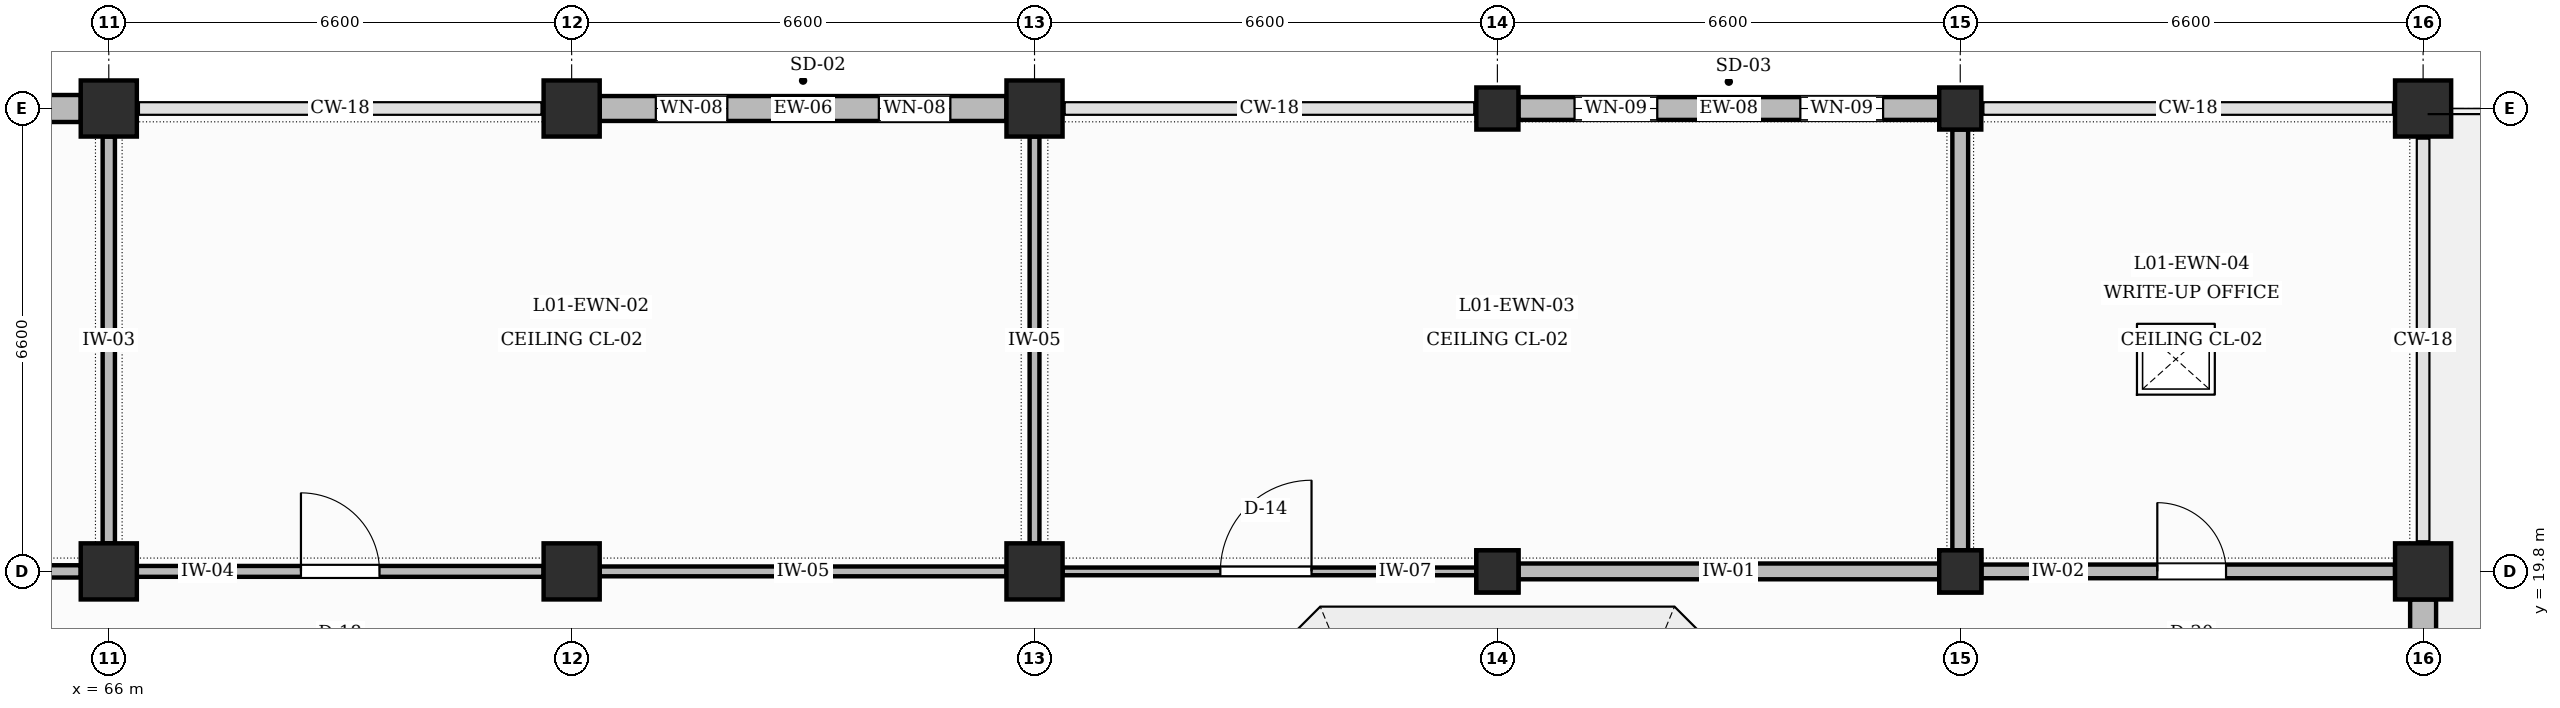
"""IFC4 building model, lengths in metres.
Left out: names, types, materials, properties, quantities, classifications, styles, units other than length and angle.
Written with IfcOpenShell. Run it as: python <this file> out.ifc"""

import sys

from ifc_helpers import new_model, si_unit, direction, frame, frame_2d, origin, origin_2d, place, context, subcontext, project, spatial, rectangle, circle, extrude, element, fill, save


model = new_model("IFC4")
c1 = context("Model", 3, precision=1e-05, world=origin(), true_north=direction((0.0, 1.0)))
c2 = subcontext(c1, "Body", "Model", "MODEL_VIEW")
j1 = project(units=[si_unit("LENGTHUNIT", "METRE"), si_unit("PLANEANGLEUNIT", "RADIAN")], contexts=[c1])
p1 = place(None, origin())
s1 = spatial("IfcSite", under=j1, at=p1, CompositionType="ELEMENT")
p2 = place(p1, origin())
s2 = spatial("IfcBuilding", under=s1, at=p2, CompositionType="ELEMENT")
p3 = place(p2, frame((0.0, 0.0, 5.4)))
s3 = spatial("IfcBuildingStorey", under=s2, at=p3, CompositionType="ELEMENT", Elevation=5.4)
for number, where, z_axis, x_axis in (
    (1, (66.0, 19.8, 0.0), (0.0, 0.0, 1.0), (1.0, 0.0, 0.0)),
    (2, (66.0, 26.4, 0.0), (0.0, 0.0, 1.0), (1.0, 0.0, 0.0)),
    (3, (72.6, 19.8, 0.0), (0.0, 0.0, 1.0), (1.0, 0.0, 0.0)),
    (4, (72.6, 26.4, 0.0), (0.0, 0.0, 1.0), (1.0, 0.0, 0.0)),
    (5, (79.2, 19.8, 0.0), (0.0, 0.0, 1.0), (1.0, 0.0, 0.0)),
    (6, (79.2, 26.4, 0.0), (0.0, 0.0, 1.0), (1.0, 0.0, 0.0)),
):
    element("IfcColumn", number, at=place(p3, frame(where, z_axis=z_axis, x_axis=x_axis)), inside=s3, PredefinedType="COLUMN", context=c2, shape_type="SweptSolid", body=[
        extrude(rectangle(XDim=0.8, YDim=0.8, at=origin_2d()), origin(), (0.0, 0.0, 1.0), 4.8),
    ])
for number, where, z_axis, x_axis in (
    (7, (85.8, 19.8, 0.0), (0.0, 0.0, 1.0), (1.0, 0.0, 0.0)),
    (8, (85.8, 26.4, 0.0), (0.0, 0.0, 1.0), (1.0, 0.0, 0.0)),
    (9, (92.4, 19.8, 0.0), (0.0, 0.0, 1.0), (1.0, 0.0, 0.0)),
    (10, (92.4, 26.4, 0.0), (0.0, 0.0, 1.0), (1.0, 0.0, 0.0)),
):
    element("IfcColumn", number, at=place(p3, frame(where, z_axis=z_axis, x_axis=x_axis)), inside=s3, PredefinedType="COLUMN", context=c2, shape_type="SweptSolid", body=[
        extrude(circle(Radius=0.3, at=origin_2d()), origin(), (0.0, 0.0, 1.0), 4.8),
    ])
for number, where, z_axis, x_axis in (
    (11, (99.0, 19.8, 0.0), (0.0, 0.0, 1.0), (1.0, 0.0, 0.0)),
    (12, (99.0, 26.4, 0.0), (0.0, 0.0, 1.0), (1.0, 0.0, 0.0)),
):
    element("IfcColumn", number, at=place(p3, frame(where, z_axis=z_axis, x_axis=x_axis)), inside=s3, PredefinedType="COLUMN", context=c2, shape_type="SweptSolid", body=[
        extrude(rectangle(XDim=0.8, YDim=0.8, at=origin_2d()), origin(), (0.0, 0.0, 1.0), 4.8),
    ])
for number, where, z_axis, x_axis in (
    (13, (92.4, 19.8, 4.8), (0.0, 0.0, 1.0), (1.0, 0.0, 0.0)),
    (14, (85.8, 19.8, 4.8), (0.0, 0.0, 1.0), (1.0, 0.0, 0.0)),
):
    element("IfcColumn", number, at=place(p3, frame(where, z_axis=z_axis, x_axis=x_axis)), inside=s3, PredefinedType="COLUMN", context=c2, shape_type="SweptSolid", body=[
        extrude(rectangle(XDim=0.6, YDim=0.6, at=origin_2d()), origin(), (0.0, 0.0, 1.0), 0.65),
    ])
p4 = place(p3, frame((59.8, 26.4, 0.0), z_axis=(0.0, 0.0, 1.0), x_axis=(1.0, 0.0, 0.0)))
e15 = element("IfcWall", 15, at=p4, inside=s3, PredefinedType="SOLIDWALL", context=c2, shape_type="SweptSolid", body=[
    extrude(rectangle(XDim=5.8, YDim=0.385, at=frame_2d((2.9, 0.0))), origin(), (0.0, 0.0, 1.0), 3.85),
])
p5 = place(p4, frame((0.8, 0.0, 0.95)))
e16 = element("IfcOpeningElement", 16, at=p5, cuts=e15, PredefinedType="OPENING", context=c2, shape_type="SweptSolid", body=[
    extrude(rectangle(XDim=1.02, YDim=1.74, at=frame_2d((0.51, 0.87))), frame((0.0, 0.202, 0.0), z_axis=(0.0, -1.0, 0.0), x_axis=(1.0, 0.0, 0.0)), (0.0, 0.0, 1.0), 0.405),
])
p6 = place(p4, frame((3.98, 0.0, 0.95)))
e17 = element("IfcOpeningElement", 17, at=p6, cuts=e15, PredefinedType="OPENING", context=c2, shape_type="SweptSolid", body=[
    extrude(rectangle(XDim=1.02, YDim=1.74, at=frame_2d((0.51, 0.87))), frame((0.0, 0.202, 0.0), z_axis=(0.0, -1.0, 0.0), x_axis=(1.0, 0.0, 0.0)), (0.0, 0.0, 1.0), 0.405),
])
p7 = place(p3, frame((73.0, 26.4, 0.0), z_axis=(0.0, 0.0, 1.0), x_axis=(1.0, 0.0, 0.0)))
e18 = element("IfcWall", 18, at=p7, inside=s3, PredefinedType="SOLIDWALL", context=c2, shape_type="SweptSolid", body=[
    extrude(rectangle(XDim=5.8, YDim=0.355, at=frame_2d((2.9, 0.0))), origin(), (0.0, 0.0, 1.0), 3.85),
])
p8 = place(p7, frame((0.8, 0.0, 0.95)))
e19 = element("IfcOpeningElement", 19, at=p8, cuts=e18, PredefinedType="OPENING", context=c2, shape_type="SweptSolid", body=[
    extrude(rectangle(XDim=1.02, YDim=1.96, at=frame_2d((0.51, 0.98))), frame((0.0, 0.188, 0.0), z_axis=(0.0, -1.0, 0.0), x_axis=(1.0, 0.0, 0.0)), (0.0, 0.0, 1.0), 0.375),
])
p9 = place(p7, frame((3.98, 0.0, 0.95)))
e20 = element("IfcOpeningElement", 20, at=p9, cuts=e18, PredefinedType="OPENING", context=c2, shape_type="SweptSolid", body=[
    extrude(rectangle(XDim=1.02, YDim=1.96, at=frame_2d((0.51, 0.98))), frame((0.0, 0.188, 0.0), z_axis=(0.0, -1.0, 0.0), x_axis=(1.0, 0.0, 0.0)), (0.0, 0.0, 1.0), 0.375),
])
p10 = place(p3, frame((86.1, 26.4, 0.0), z_axis=(0.0, 0.0, 1.0), x_axis=(1.0, 0.0, 0.0)))
e21 = element("IfcWall", 21, at=p10, inside=s3, PredefinedType="SOLIDWALL", context=c2, shape_type="SweptSolid", body=[
    extrude(rectangle(XDim=6.0, YDim=0.325, at=frame_2d((3.0, 0.0))), origin(), (0.0, 0.0, 1.0), 3.85),
])
p11 = place(p10, frame((0.8, 0.0, 0.95)))
e22 = element("IfcOpeningElement", 22, at=p11, cuts=e21, PredefinedType="OPENING", context=c2, shape_type="SweptSolid", body=[
    extrude(rectangle(XDim=1.18, YDim=1.3, at=frame_2d((0.59, 0.65))), frame((0.0, 0.172, 0.0), z_axis=(0.0, -1.0, 0.0), x_axis=(1.0, 0.0, 0.0)), (0.0, 0.0, 1.0), 0.345),
])
p12 = place(p10, frame((4.02, 0.0, 0.95)))
e23 = element("IfcOpeningElement", 23, at=p12, cuts=e21, PredefinedType="OPENING", context=c2, shape_type="SweptSolid", body=[
    extrude(rectangle(XDim=1.18, YDim=1.3, at=frame_2d((0.59, 0.65))), frame((0.0, 0.172, 0.0), z_axis=(0.0, -1.0, 0.0), x_axis=(1.0, 0.0, 0.0)), (0.0, 0.0, 1.0), 0.345),
])
p13 = place(p3, frame((99.0, 13.6, 0.0), z_axis=(0.0, 0.0, 1.0), x_axis=(0.0, 1.0, 0.0)))
e24 = element("IfcWall", 24, at=p13, inside=s3, PredefinedType="SOLIDWALL", context=c2, shape_type="SweptSolid", body=[
    extrude(rectangle(XDim=5.8, YDim=0.37, at=frame_2d((2.9, 0.0))), origin(), (0.0, 0.0, 1.0), 3.85),
])
p14 = place(p13, frame((2.275, 0.0, 0.0)))
e25 = element("IfcOpeningElement", 25, at=p14, cuts=e24, PredefinedType="OPENING", context=c2, shape_type="SweptSolid", body=[
    extrude(rectangle(XDim=1.25, YDim=2.2, at=frame_2d((0.625, 1.1))), frame((0.0, 0.195, 0.0), z_axis=(0.0, -1.0, 0.0), x_axis=(1.0, 0.0, 0.0)), (0.0, 0.0, 1.0), 0.39),
])
p15 = place(p3, frame((59.8, 19.8, 0.0), z_axis=(0.0, 0.0, 1.0), x_axis=(1.0, 0.0, 0.0)))
e26 = element("IfcWall", 26, at=p15, inside=s3, PredefinedType="PARTITIONING", context=c2, shape_type="SweptSolid", body=[
    extrude(rectangle(XDim=5.8, YDim=0.175, at=frame_2d((2.9, 0.0))), origin(), (0.0, 0.0, 1.0), 3.6),
])
p16 = place(p3, frame((66.0, 20.2, 0.0), z_axis=(0.0, 0.0, 1.0), x_axis=(0.0, 1.0, 0.0)))
e27 = element("IfcWall", 27, at=p16, inside=s3, PredefinedType="PARTITIONING", context=c2, shape_type="SweptSolid", body=[
    extrude(rectangle(XDim=5.8, YDim=0.175, at=frame_2d((2.9, 0.0))), origin(), (0.0, 0.0, 1.0), 3.7),
])
p17 = place(p3, frame((66.4, 19.8, 0.0), z_axis=(0.0, 0.0, 1.0), x_axis=(1.0, 0.0, 0.0)))
e28 = element("IfcWall", 28, at=p17, inside=s3, PredefinedType="PARTITIONING", context=c2, shape_type="SweptSolid", body=[
    extrude(rectangle(XDim=5.8, YDim=0.155, at=frame_2d((2.9, 0.0))), origin(), (0.0, 0.0, 1.0), 3.7),
])
p18 = place(p17, frame((2.34, 0.0, 0.0)))
e29 = element("IfcOpeningElement", 29, at=p18, cuts=e28, PredefinedType="OPENING", context=c2, shape_type="SweptSolid", body=[
    extrude(rectangle(XDim=1.12, YDim=2.2, at=frame_2d((0.56, 1.1))), frame((0.0, 0.087, 0.0), z_axis=(0.0, -1.0, 0.0), x_axis=(1.0, 0.0, 0.0)), (0.0, 0.0, 1.0), 0.175),
])
p19 = place(p3, frame((73.0, 19.8, 0.0), z_axis=(0.0, 0.0, 1.0), x_axis=(1.0, 0.0, 0.0)))
e30 = element("IfcWall", 30, at=p19, inside=s3, PredefinedType="PARTITIONING", context=c2, shape_type="SweptSolid", body=[
    extrude(rectangle(XDim=5.8, YDim=0.14, at=frame_2d((2.9, 0.0))), origin(), (0.0, 0.0, 1.0), 3.6),
])
p20 = place(p3, frame((79.2, 20.2, 0.0), z_axis=(0.0, 0.0, 1.0), x_axis=(0.0, 1.0, 0.0)))
e31 = element("IfcWall", 31, at=p20, inside=s3, PredefinedType="PARTITIONING", context=c2, shape_type="SweptSolid", body=[
    extrude(rectangle(XDim=5.8, YDim=0.14, at=frame_2d((2.9, 0.0))), origin(), (0.0, 0.0, 1.0), 3.7),
])
p21 = place(p3, frame((79.6, 19.8, 0.0), z_axis=(0.0, 0.0, 1.0), x_axis=(1.0, 0.0, 0.0)))
e32 = element("IfcWall", 32, at=p21, inside=s3, PredefinedType="PARTITIONING", context=c2, shape_type="SweptSolid", body=[
    extrude(rectangle(XDim=5.9, YDim=0.11, at=frame_2d((2.95, 0.0))), origin(), (0.0, 0.0, 1.0), 3.7),
])
p22 = place(p21, frame((2.25, 0.0, 0.0)))
e33 = element("IfcOpeningElement", 33, at=p22, cuts=e32, PredefinedType="OPENING", context=c2, shape_type="SweptSolid", body=[
    extrude(rectangle(XDim=1.3, YDim=2.3, at=frame_2d((0.65, 1.15))), frame((0.0, 0.065, 0.0), z_axis=(0.0, -1.0, 0.0), x_axis=(1.0, 0.0, 0.0)), (0.0, 0.0, 1.0), 0.13),
])
p23 = place(p3, frame((86.1, 19.8, 0.0), z_axis=(0.0, 0.0, 1.0), x_axis=(1.0, 0.0, 0.0)))
e34 = element("IfcWall", 34, at=p23, inside=s3, PredefinedType="PARTITIONING", context=c2, shape_type="SweptSolid", body=[
    extrude(rectangle(XDim=6.0, YDim=0.225, at=frame_2d((3.0, 0.0))), origin(), (0.0, 0.0, 1.0), 3.6),
])
p24 = place(p3, frame((92.4, 20.1, 0.0), z_axis=(0.0, 0.0, 1.0), x_axis=(0.0, 1.0, 0.0)))
e35 = element("IfcWall", 35, at=p24, inside=s3, PredefinedType="PARTITIONING", context=c2, shape_type="SweptSolid", body=[
    extrude(rectangle(XDim=6.0, YDim=0.225, at=frame_2d((3.0, 0.0))), origin(), (0.0, 0.0, 1.0), 3.7),
])
p25 = place(p3, frame((92.7, 19.8, 0.0), z_axis=(0.0, 0.0, 1.0), x_axis=(1.0, 0.0, 0.0)))
e36 = element("IfcWall", 36, at=p25, inside=s3, PredefinedType="PARTITIONING", context=c2, shape_type="SweptSolid", body=[
    extrude(rectangle(XDim=5.9, YDim=0.195, at=frame_2d((2.95, 0.0))), origin(), (0.0, 0.0, 1.0), 3.7),
])
p26 = place(p25, frame((2.51, 0.0, 0.0)))
e37 = element("IfcOpeningElement", 37, at=p26, cuts=e36, PredefinedType="OPENING", context=c2, shape_type="SweptSolid", body=[
    extrude(rectangle(XDim=0.98, YDim=2.15, at=frame_2d((0.49, 1.075))), frame((0.0, 0.107, 0.0), z_axis=(0.0, -1.0, 0.0), x_axis=(1.0, 0.0, 0.0)), (0.0, 0.0, 1.0), 0.215),
])
p27 = place(p8, origin())
e38 = element("IfcWindow", 38, at=p27, inside=s3, PartitioningType="SINGLE_PANEL", PredefinedType="WINDOW", context=c2, shape_type="SweptSolid", body=[
    extrude(rectangle(XDim=1.02, YDim=1.96, at=frame_2d((0.51, 0.98))), frame((0.0, 0.03, 0.0), z_axis=(0.0, -1.0, 0.0), x_axis=(1.0, 0.0, 0.0)), (0.0, 0.0, 1.0), 0.06),
])
fill(e19, e38)
p28 = place(p9, origin())
e39 = element("IfcWindow", 39, at=p28, inside=s3, PartitioningType="SINGLE_PANEL", PredefinedType="WINDOW", context=c2, shape_type="SweptSolid", body=[
    extrude(rectangle(XDim=1.02, YDim=1.96, at=frame_2d((0.51, 0.98))), frame((0.0, 0.03, 0.0), z_axis=(0.0, -1.0, 0.0), x_axis=(1.0, 0.0, 0.0)), (0.0, 0.0, 1.0), 0.06),
])
fill(e20, e39)
p29 = place(p11, origin())
e40 = element("IfcWindow", 40, at=p29, inside=s3, PartitioningType="SINGLE_PANEL", PredefinedType="WINDOW", context=c2, shape_type="SweptSolid", body=[
    extrude(rectangle(XDim=1.18, YDim=1.3, at=frame_2d((0.59, 0.65))), frame((0.0, 0.03, 0.0), z_axis=(0.0, -1.0, 0.0), x_axis=(1.0, 0.0, 0.0)), (0.0, 0.0, 1.0), 0.06),
])
fill(e22, e40)
p30 = place(p12, origin())
e41 = element("IfcWindow", 41, at=p30, inside=s3, PartitioningType="SINGLE_PANEL", PredefinedType="WINDOW", context=c2, shape_type="SweptSolid", body=[
    extrude(rectangle(XDim=1.18, YDim=1.3, at=frame_2d((0.59, 0.65))), frame((0.0, 0.03, 0.0), z_axis=(0.0, -1.0, 0.0), x_axis=(1.0, 0.0, 0.0)), (0.0, 0.0, 1.0), 0.06),
])
fill(e23, e41)
p31 = place(p18, origin())
e42 = element("IfcDoor", 42, at=p31, inside=s3, OperationType="SINGLE_SWING_LEFT", PredefinedType="DOOR", context=c2, shape_type="SweptSolid", body=[
    extrude(rectangle(XDim=1.12, YDim=2.2, at=frame_2d((0.56, 1.1))), frame((0.0, 0.025, 0.0), z_axis=(0.0, -1.0, 0.0), x_axis=(1.0, 0.0, 0.0)), (0.0, 0.0, 1.0), 0.05),
])
fill(e29, e42)
p32 = place(p22, origin())
e43 = element("IfcDoor", 43, at=p32, inside=s3, OperationType="SINGLE_SWING_RIGHT", PredefinedType="DOOR", context=c2, shape_type="SweptSolid", body=[
    extrude(rectangle(XDim=1.3, YDim=2.3, at=frame_2d((0.65, 1.15))), frame((0.0, 0.025, 0.0), z_axis=(0.0, -1.0, 0.0), x_axis=(1.0, 0.0, 0.0)), (0.0, 0.0, 1.0), 0.05),
])
fill(e33, e43)
p33 = place(p26, origin())
e44 = element("IfcDoor", 44, at=p33, inside=s3, OperationType="SINGLE_SWING_LEFT", PredefinedType="DOOR", context=c2, shape_type="SweptSolid", body=[
    extrude(rectangle(XDim=0.98, YDim=2.15, at=frame_2d((0.49, 1.075))), frame((0.0, 0.025, 0.0), z_axis=(0.0, -1.0, 0.0), x_axis=(1.0, 0.0, 0.0)), (0.0, 0.0, 1.0), 0.05),
])
fill(e37, e44)
save(model, sys.argv[1])
